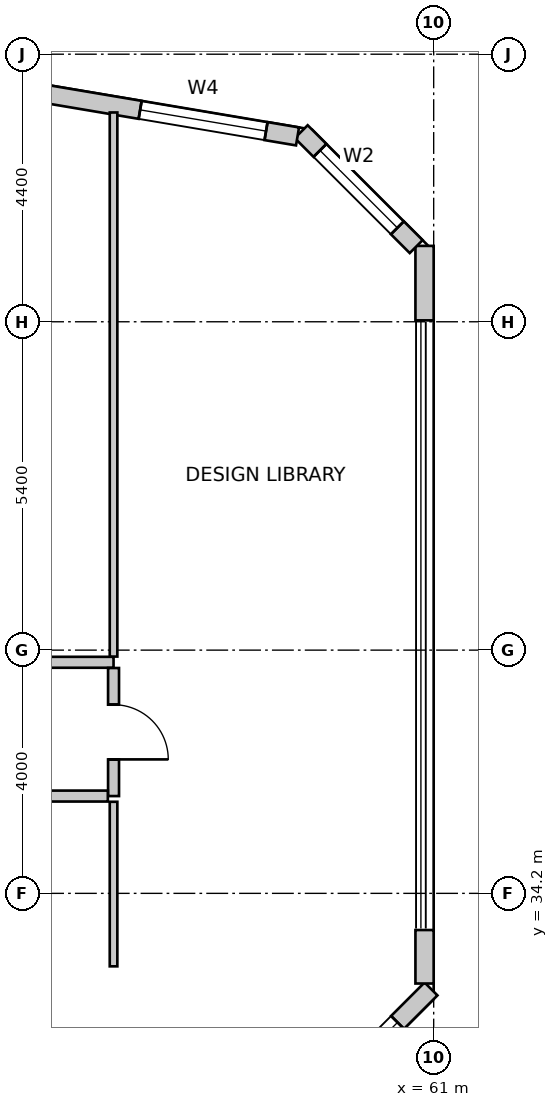
"""IFC4 building model, lengths in metres.
Left out: names, types, materials, properties, quantities, classifications, styles, units other than length and angle.
Written with IfcOpenShell. Run it as: python <this file> out.ifc"""

import sys

from ifc_helpers import new_model, si_unit, direction, frame, frame_2d, origin, place, context, subcontext, project, spatial, rectangle, extrude, source, transform, mapped, element, fill, save


model = new_model("IFC4")
c1 = context("Model", 3, precision=1e-05, world=origin(), true_north=direction((0.0, 1.0)))
c2 = subcontext(c1, "Body", "Model", "MODEL_VIEW")
j1 = project(units=[si_unit("LENGTHUNIT", "METRE"), si_unit("PLANEANGLEUNIT", "RADIAN")], contexts=[c1])
p1 = place(None, origin())
s1 = spatial("IfcSite", under=j1, at=p1, CompositionType="ELEMENT")
p2 = place(p1, origin())
s2 = spatial("IfcBuilding", under=s1, at=p2, CompositionType="ELEMENT")
p3 = place(p2, frame((0.0, 0.0, 55.0)))
s3 = spatial("IfcBuildingStorey", under=s2, at=p3, CompositionType="ELEMENT", Elevation=55.0)
p4 = place(p3, frame((57.876, 29.548, 0.0), z_axis=(0.0, 0.0, 1.0), x_axis=(0.707106781187, 0.707106781187, 0.0)))
e1 = element("IfcWall", 1, at=p4, inside=s3, PredefinedType="SOLIDWALL", context=c2, shape_type="SweptSolid", body=[
    extrude(rectangle(XDim=4.356, YDim=0.3, at=frame_2d((2.178, 0.0))), origin(), (0.0, 0.0, 1.0), 3.75),
])
m1 = source(origin(), c2, "Body", "SweptSolid", [
    extrude(rectangle(XDim=2.8, YDim=2.4, at=frame_2d((1.4, 1.2))), frame((0.0, 0.16, 0.0), z_axis=(0.0, -1.0, 0.0), x_axis=(1.0, 0.0, 0.0)), (0.0, 0.0, 1.0), 0.32),
])
p5 = place(p4, frame((0.778, 0.0, 0.85)))
e2 = element("IfcOpeningElement", 2, at=p5, cuts=e1, PredefinedType="OPENING", context=c2, shape_type="MappedRepresentation", body=[
    mapped(m1, transform((0.0, 0.0, 0.0), scale=1.0)),
])
p6 = place(p3, frame((60.85, 32.717, 0.0), z_axis=(0.0, 0.0, 1.0), x_axis=(0.0, 1.0, 0.0)))
e3 = element("IfcWall", 3, at=p6, inside=s3, PredefinedType="SOLIDWALL", context=c2, shape_type="SweptSolid", body=[
    extrude(rectangle(XDim=0.88, YDim=0.3, at=frame_2d((0.44, 0.0))), origin(), (0.0, 0.0, 1.0), 3.75),
])
p7 = place(p3, frame((60.85, 43.623, 0.0), z_axis=(0.0, 0.0, 1.0), x_axis=(0.0, 1.0, 0.0)))
e4 = element("IfcWall", 4, at=p7, inside=s3, PredefinedType="SOLIDWALL", context=c2, shape_type="SweptSolid", body=[
    extrude(rectangle(XDim=1.225, YDim=0.3, at=frame_2d((0.613, 0.0))), origin(), (0.0, 0.0, 1.0), 3.75),
])
p8 = place(p3, frame((60.712, 44.836, 0.0), z_axis=(0.0, 0.0, 1.0), x_axis=(-0.707106781187, 0.707106781187, 0.0)))
e5 = element("IfcWall", 5, at=p8, inside=s3, PredefinedType="SOLIDWALL", context=c2, shape_type="SweptSolid", body=[
    extrude(rectangle(XDim=2.673, YDim=0.3, at=frame_2d((1.336, 0.0))), origin(), (0.0, 0.0, 1.0), 3.75),
])
m2 = source(origin(), c2, "Body", "SweptSolid", [
    extrude(rectangle(XDim=1.8, YDim=2.1, at=frame_2d((0.9, 1.05))), frame((0.0, 0.16, 0.0), z_axis=(0.0, -1.0, 0.0), x_axis=(1.0, 0.0, 0.0)), (0.0, 0.0, 1.0), 0.32),
])
p9 = place(p8, frame((0.437, 0.0, 0.85)))
e6 = element("IfcOpeningElement", 6, at=p9, cuts=e5, PredefinedType="OPENING", context=c2, shape_type="MappedRepresentation", body=[
    mapped(m2, transform((0.0, 0.0, 0.0), scale=1.0)),
])
p10 = place(p3, frame((58.761, 46.648, 0.0), z_axis=(0.0, 0.0, 1.0), x_axis=(-0.98607502735, 0.166301053624, 0.0)))
e7 = element("IfcWall", 7, at=p10, inside=s3, PredefinedType="SOLIDWALL", context=c2, shape_type="SweptSolid", body=[
    extrude(rectangle(XDim=37.397, YDim=0.3, at=frame_2d((18.699, 0.0))), origin(), (0.0, 0.0, 1.0), 3.75),
])
m3 = source(origin(), c2, "Body", "SweptSolid", [
    extrude(rectangle(XDim=2.1, YDim=2.0, at=frame_2d((1.05, 1.0))), frame((0.0, 0.16, 0.0), z_axis=(0.0, -1.0, 0.0), x_axis=(1.0, 0.0, 0.0)), (0.0, 0.0, 1.0), 0.32),
])
p11 = place(p10, frame((0.525, 0.0, 0.85)))
e8 = element("IfcOpeningElement", 8, at=p11, cuts=e7, PredefinedType="OPENING", context=c2, shape_type="MappedRepresentation", body=[
    mapped(m3, transform((0.0, 0.0, 0.0), scale=1.0)),
])
m4 = source(origin(), c2, "Body", "SweptSolid", [
    extrude(rectangle(XDim=2.4, YDim=2.2, at=frame_2d((1.2, 1.1))), frame((0.0, 0.16, 0.0), z_axis=(0.0, -1.0, 0.0), x_axis=(1.0, 0.0, 0.0)), (0.0, 0.0, 1.0), 0.32),
])
p12 = place(p10, frame((5.557, 0.0, 0.85)))
e9 = element("IfcOpeningElement", 9, at=p12, cuts=e7, PredefinedType="OPENING", context=c2, shape_type="MappedRepresentation", body=[
    mapped(m4, transform((0.0, 0.0, 0.0), scale=1.0)),
])
p13 = place(p10, frame((12.972, 0.0, 0.85)))
e10 = element("IfcOpeningElement", 10, at=p13, cuts=e7, PredefinedType="OPENING", context=c2, shape_type="MappedRepresentation", body=[
    mapped(m4, transform((0.0, 0.0, 0.0), scale=1.0)),
])
p14 = place(p10, frame((19.394, 0.0, 0.85)))
e11 = element("IfcOpeningElement", 11, at=p14, cuts=e7, PredefinedType="OPENING", context=c2, shape_type="MappedRepresentation", body=[
    mapped(m4, transform((0.0, 0.0, 0.0), scale=1.0)),
])
p15 = place(p10, frame((24.184, 0.0, 0.85)))
e12 = element("IfcOpeningElement", 12, at=p15, cuts=e7, PredefinedType="OPENING", context=c2, shape_type="MappedRepresentation", body=[
    mapped(m1, transform((0.0, 0.0, 0.0), scale=1.0)),
])
p16 = place(p10, frame((29.957, 0.0, 0.85)))
e13 = element("IfcOpeningElement", 13, at=p16, cuts=e7, PredefinedType="OPENING", context=c2, shape_type="MappedRepresentation", body=[
    mapped(m4, transform((0.0, 0.0, 0.0), scale=1.0)),
])
p17 = place(p10, frame((34.456, 0.0, 0.85)))
e14 = element("IfcOpeningElement", 14, at=p17, cuts=e7, PredefinedType="OPENING", context=c2, shape_type="MappedRepresentation", body=[
    mapped(m4, transform((0.0, 0.0, 0.0), scale=1.0)),
])
p18 = place(p3, frame((48.585, 38.0, 0.0), z_axis=(0.0, 0.0, 1.0), x_axis=(1.0, 0.0, 0.0)))
e15 = element("IfcWall", 15, at=p18, inside=s3, PredefinedType="PARTITIONING", context=c2, shape_type="SweptSolid", body=[
    extrude(rectangle(XDim=7.15, YDim=0.18, at=frame_2d((3.575, 0.0))), origin(), (0.0, 0.0, 1.0), 3.75),
])
m5 = source(origin(), c2, "Body", "SweptSolid", [
    extrude(rectangle(XDim=0.9, YDim=2.15, at=frame_2d((0.45, 1.075))), frame((0.0, 0.1, 0.0), z_axis=(0.0, -1.0, 0.0), x_axis=(1.0, 0.0, 0.0)), (0.0, 0.0, 1.0), 0.2),
])
p19 = place(p18, frame((3.064, 0.0, 0.0)))
e16 = element("IfcOpeningElement", 16, at=p19, cuts=e15, PredefinedType="OPENING", context=c2, shape_type="MappedRepresentation", body=[
    mapped(m5, transform((0.0, 0.0, 0.0), scale=1.0)),
])
p20 = place(p3, frame((55.735, 37.906, 0.0), z_axis=(0.0, 0.0, 1.0), x_axis=(0.0, -1.0, 0.0)))
e17 = element("IfcWall", 17, at=p20, inside=s3, PredefinedType="PARTITIONING", context=c2, shape_type="SweptSolid", body=[
    extrude(rectangle(XDim=2.106, YDim=0.18, at=frame_2d((1.053, 0.0))), origin(), (0.0, 0.0, 1.0), 3.75),
])
p21 = place(p20, frame((0.603, 0.0, 0.0)))
e18 = element("IfcOpeningElement", 18, at=p21, cuts=e17, PredefinedType="OPENING", context=c2, shape_type="MappedRepresentation", body=[
    mapped(m5, transform((0.0, 0.0, 0.0), scale=1.0)),
])
p22 = place(p3, frame((55.641, 35.8, 0.0), z_axis=(0.0, 0.0, 1.0), x_axis=(-1.0, 0.0, 0.0)))
e19 = element("IfcWall", 19, at=p22, inside=s3, PredefinedType="PARTITIONING", context=c2, shape_type="SweptSolid", body=[
    extrude(rectangle(XDim=21.841, YDim=0.18, at=frame_2d((10.92, 0.0))), origin(), (0.0, 0.0, 1.0), 3.125),
])
p23 = place(p22, frame((10.531, 0.0, 0.0)))
e20 = element("IfcOpeningElement", 20, at=p23, cuts=e19, PredefinedType="OPENING", context=c2, shape_type="MappedRepresentation", body=[
    mapped(m5, transform((0.0, 0.0, 0.0), scale=1.0)),
])
p24 = place(p3, frame((55.735, 47.042, 0.0), z_axis=(0.0, 0.0, 1.0), x_axis=(0.0, -1.0, 0.0)))
e21 = element("IfcWall", 21, at=p24, inside=s3, PredefinedType="PARTITIONING", context=c2, shape_type="SweptSolid", body=[
    extrude(rectangle(XDim=8.948, YDim=0.125, at=frame_2d((4.474, 0.0))), origin(), (0.0, 0.0, 1.0), 3.75),
])
p25 = place(p3, frame((55.735, 33.0, 0.0), z_axis=(0.0, 0.0, 1.0), x_axis=(0.0, 1.0, 0.0)))
e22 = element("IfcWall", 22, at=p25, inside=s3, PredefinedType="PARTITIONING", context=c2, shape_type="SweptSolid", body=[
    extrude(rectangle(XDim=2.706, YDim=0.125, at=frame_2d((1.353, 0.0))), origin(), (0.0, 0.0, 1.0), 3.75),
])
m6 = source(origin(), c2, "Body", "SweptSolid", [
    extrude(rectangle(XDim=2.8, YDim=2.4, at=frame_2d((1.4, 1.2))), frame((0.0, -0.015, 0.0), z_axis=(0.0, -1.0, 0.0), x_axis=(1.0, 0.0, 0.0)), (0.0, 0.0, 1.0), 0.06),
])
p26 = place(p5, origin())
e23 = element("IfcWindow", 23, at=p26, inside=s3, PartitioningType="SINGLE_PANEL", PredefinedType="WINDOW", context=c2, shape_type="MappedRepresentation", body=[
    mapped(m6, transform((0.0, 0.0, 0.0), scale=1.0)),
])
fill(e2, e23)
m7 = source(origin(), c2, "Body", "SweptSolid", [
    extrude(rectangle(XDim=1.8, YDim=2.1, at=frame_2d((0.9, 1.05))), frame((0.0, -0.015, 0.0), z_axis=(0.0, -1.0, 0.0), x_axis=(1.0, 0.0, 0.0)), (0.0, 0.0, 1.0), 0.06),
])
p27 = place(p9, origin())
e24 = element("IfcWindow", 24, at=p27, inside=s3, PartitioningType="SINGLE_PANEL", PredefinedType="WINDOW", context=c2, shape_type="MappedRepresentation", body=[
    mapped(m7, transform((0.0, 0.0, 0.0), scale=1.0)),
])
fill(e6, e24)
m8 = source(origin(), c2, "Body", "SweptSolid", [
    extrude(rectangle(XDim=2.1, YDim=2.0, at=frame_2d((1.05, 1.0))), frame((0.0, -0.015, 0.0), z_axis=(0.0, -1.0, 0.0), x_axis=(1.0, 0.0, 0.0)), (0.0, 0.0, 1.0), 0.06),
])
p28 = place(p11, origin())
e25 = element("IfcWindow", 25, at=p28, inside=s3, PartitioningType="SINGLE_PANEL", PredefinedType="WINDOW", context=c2, shape_type="MappedRepresentation", body=[
    mapped(m8, transform((0.0, 0.0, 0.0), scale=1.0)),
])
fill(e8, e25)
m9 = source(origin(), c2, "Body", "SweptSolid", [
    extrude(rectangle(XDim=0.9, YDim=2.15, at=frame_2d((0.45, 1.075))), frame((0.0, 0.025, 0.0), z_axis=(0.0, -1.0, 0.0), x_axis=(1.0, 0.0, 0.0)), (0.0, 0.0, 1.0), 0.05),
])
p29 = place(p21, origin())
e26 = element("IfcDoor", 26, at=p29, inside=s3, OperationType="SINGLE_SWING_RIGHT", PredefinedType="DOOR", context=c2, shape_type="MappedRepresentation", body=[
    mapped(m9, transform((0.0, 0.0, 0.0), scale=1.0)),
])
fill(e18, e26)
save(model, sys.argv[1])
